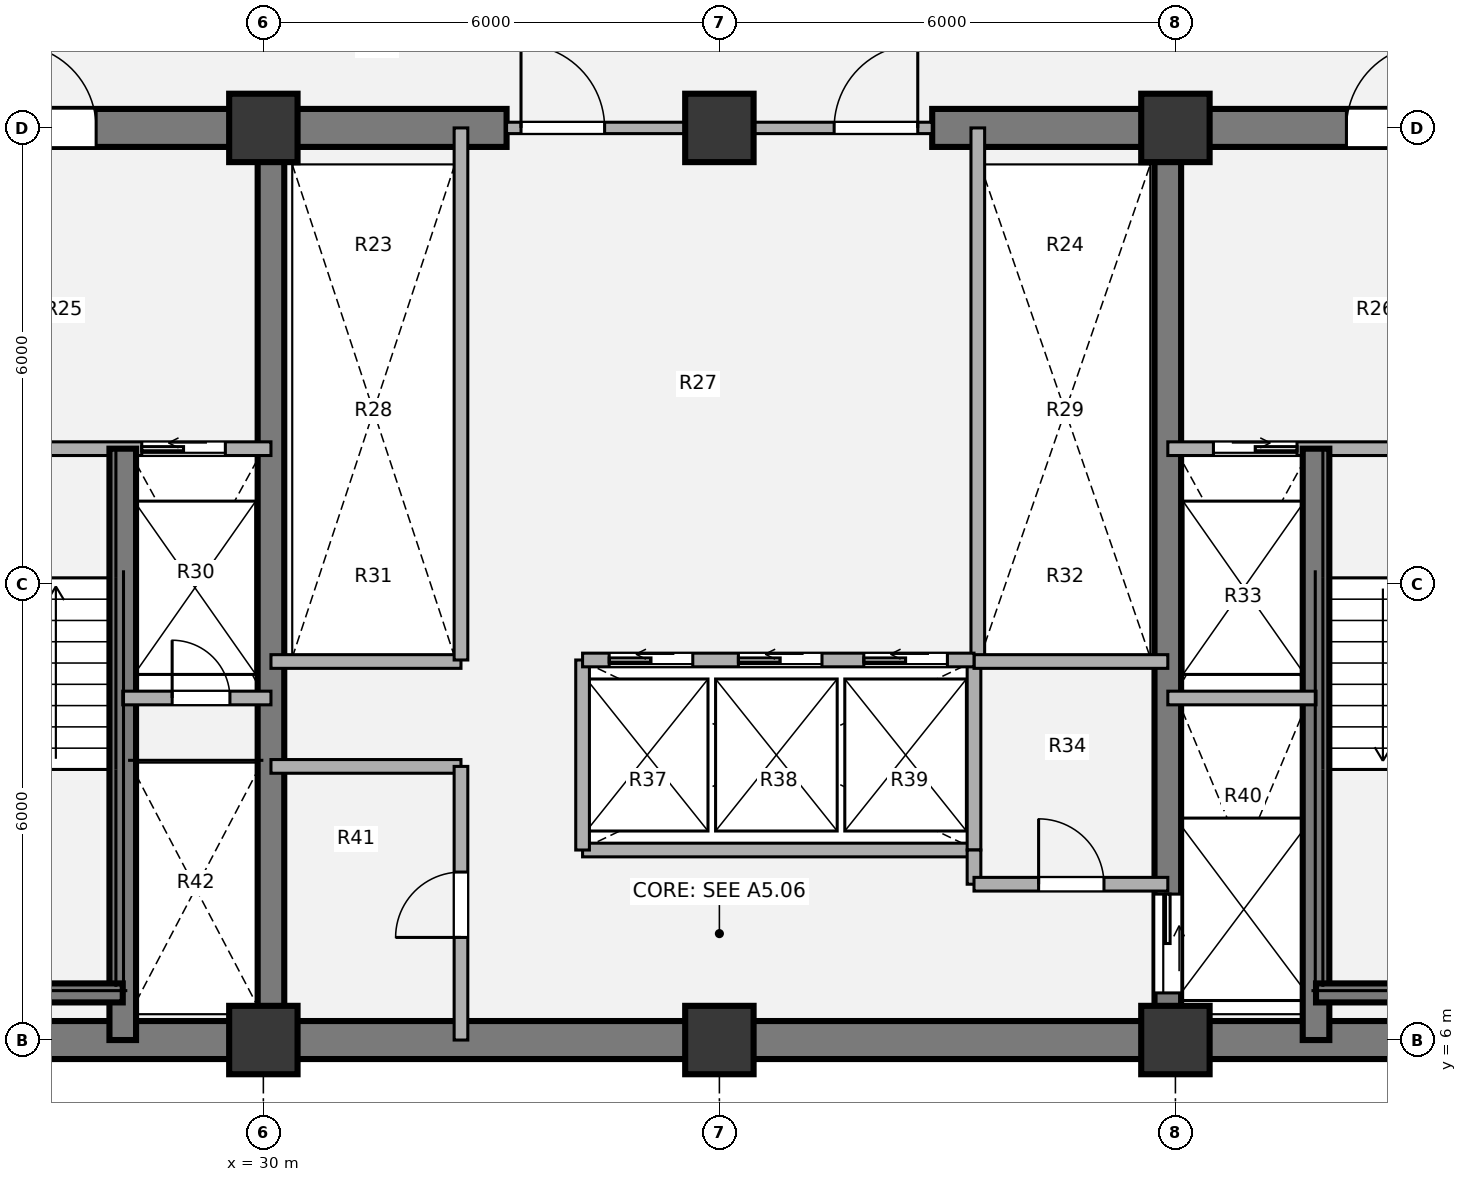
"""IFC4 building model, lengths in metres.
Left out: names, types, materials, properties, quantities, classifications, styles, units other than length and angle.
Written with IfcOpenShell. Run it as: python <this file> out.ifc"""

import sys

from ifc_helpers import new_model, si_unit, direction, frame, frame_2d, origin, origin_2d, place, context, subcontext, project, spatial, rectangle, extrude, source, transform, mapped, element, fill, save


model = new_model("IFC4")
c1 = context("Model", 3, precision=1e-05, world=origin(), true_north=direction((0.0, 1.0)))
c2 = subcontext(c1, "Body", "Model", "MODEL_VIEW")
j1 = project(units=[si_unit("LENGTHUNIT", "METRE"), si_unit("PLANEANGLEUNIT", "RADIAN")], contexts=[c1])
p1 = place(None, origin())
s1 = spatial("IfcSite", under=j1, at=p1, CompositionType="ELEMENT")
p2 = place(p1, origin())
s2 = spatial("IfcBuilding", under=s1, at=p2, CompositionType="ELEMENT")
p3 = place(p2, frame((0.0, 0.0, 89.82)))
s3 = spatial("IfcBuildingStorey", under=s2, at=p3, CompositionType="ELEMENT", Elevation=89.82)
m1 = source(origin(), c2, "Body", "SweptSolid", [
    extrude(rectangle(XDim=0.9, YDim=0.9, at=origin_2d()), origin(), (0.0, 0.0, 1.0), 3.78),
])
for number, where, z_axis, x_axis in (
    (1, (30.0, 6.0, 0.0), (0.0, 0.0, 1.0), (1.0, 0.0, 0.0)),
    (2, (36.0, 6.0, 0.0), (0.0, 0.0, 1.0), (1.0, 0.0, 0.0)),
    (3, (42.0, 6.0, 0.0), (0.0, 0.0, 1.0), (1.0, 0.0, 0.0)),
    (4, (30.0, 18.0, 0.0), (0.0, 0.0, 1.0), (1.0, 0.0, 0.0)),
    (5, (36.0, 18.0, 0.0), (0.0, 0.0, 1.0), (1.0, 0.0, 0.0)),
    (6, (42.0, 18.0, 0.0), (0.0, 0.0, 1.0), (1.0, 0.0, 0.0)),
):
    element("IfcColumn", number, at=place(p3, frame(where, z_axis=z_axis, x_axis=x_axis)), inside=s3, PredefinedType="COLUMN", context=c2, shape_type="MappedRepresentation", body=[
        mapped(m1, transform((0.0, 0.0, 0.0), x_axis=(1.0, 0.0, 0.0), y_axis=(0.0, 1.0, 0.0), z_axis=(0.0, 0.0, 1.0), scale=1.0)),
    ])
p4 = place(p3, frame((48.25, 6.0, 0.0), z_axis=(0.0, 0.0, 1.0), x_axis=(-1.0, 0.0, 0.0)))
e7 = element("IfcWall", 7, at=p4, inside=s3, PredefinedType="SHEAR", context=c2, shape_type="SweptSolid", body=[
    extrude(rectangle(XDim=24.5, YDim=0.5, at=frame_2d((12.25, 0.0))), origin(), (0.0, 0.0, 1.0), 3.78),
])
p5 = place(p3, frame((23.75, 18.0, 0.0), z_axis=(0.0, 0.0, 1.0), x_axis=(1.0, 0.0, 0.0)))
e8 = element("IfcWall", 8, at=p5, inside=s3, PredefinedType="SHEAR", context=c2, shape_type="SweptSolid", body=[
    extrude(rectangle(XDim=9.45, YDim=0.5, at=frame_2d((4.725, 0.0))), origin(), (0.0, 0.0, 1.0), 3.78),
])
p6 = place(p5, frame((2.95, 0.0, 0.0)))
e9 = element("IfcOpeningElement", 9, at=p6, cuts=e8, PredefinedType="OPENING", context=c2, shape_type="SweptSolid", body=[
    extrude(rectangle(XDim=1.1, YDim=2.1, at=origin_2d()), frame((0.55, 0.26, 1.05), z_axis=(0.0, -1.0, 0.0), x_axis=(1.0, 0.0, 0.0)), (0.0, 0.0, 1.0), 0.52),
])
p7 = place(p3, frame((38.8, 18.0, 0.0), z_axis=(0.0, 0.0, 1.0), x_axis=(1.0, 0.0, 0.0)))
e10 = element("IfcWall", 10, at=p7, inside=s3, PredefinedType="SHEAR", context=c2, shape_type="SweptSolid", body=[
    extrude(rectangle(XDim=9.45, YDim=0.5, at=frame_2d((4.725, 0.0))), origin(), (0.0, 0.0, 1.0), 3.78),
])
p8 = place(p7, frame((5.45, 0.0, 0.0)))
e11 = element("IfcOpeningElement", 11, at=p8, cuts=e10, PredefinedType="OPENING", context=c2, shape_type="SweptSolid", body=[
    extrude(rectangle(XDim=1.1, YDim=2.1, at=origin_2d()), frame((0.55, 0.26, 1.05), z_axis=(0.0, -1.0, 0.0), x_axis=(1.0, 0.0, 0.0)), (0.0, 0.0, 1.0), 0.52),
])
p9 = place(p3, frame((30.1, 6.0, 0.0), z_axis=(0.0, 0.0, 1.0), x_axis=(0.0, 1.0, 0.0)))
e12 = element("IfcWall", 12, at=p9, inside=s3, PredefinedType="SHEAR", context=c2, shape_type="SweptSolid", body=[
    extrude(rectangle(XDim=12.0, YDim=0.35, at=frame_2d((6.0, 0.0))), origin(), (0.0, 0.0, 1.0), 3.78),
])
p10 = place(p3, frame((41.9, 18.0, 0.0), z_axis=(0.0, 0.0, 1.0), x_axis=(0.0, -1.0, 0.0)))
e13 = element("IfcWall", 13, at=p10, inside=s3, PredefinedType="SHEAR", context=c2, shape_type="SweptSolid", body=[
    extrude(rectangle(XDim=12.0, YDim=0.35, at=frame_2d((6.0, 0.0))), origin(), (0.0, 0.0, 1.0), 3.78),
])
p11 = place(p10, frame((10.08, 0.0, 0.0)))
e14 = element("IfcOpeningElement", 14, at=p11, cuts=e13, PredefinedType="OPENING", context=c2, shape_type="SweptSolid", body=[
    extrude(rectangle(XDim=1.3, YDim=2.1, at=origin_2d()), frame((0.65, 0.185, 1.05), z_axis=(0.0, -1.0, 0.0), x_axis=(1.0, 0.0, 0.0)), (0.0, 0.0, 1.0), 0.37),
])
p12 = place(p3, frame((34.2, 8.5, 0.0), z_axis=(0.0, 0.0, 1.0), x_axis=(1.0, 0.0, 0.0)))
e15 = element("IfcWall", 15, at=p12, inside=s3, PredefinedType="PARTITIONING", context=c2, shape_type="SweptSolid", body=[
    extrude(rectangle(XDim=5.15, YDim=0.18, at=frame_2d((2.575, 0.0))), origin(), (0.0, 0.0, 1.0), 3.5),
])
for number, where, z_axis, x_axis in (
    (16, (34.2, 8.5, 0.0), (0.0, 0.0, 1.0), (0.0, 1.0, 0.0)),
    (17, (39.35, 8.5, 0.0), (0.0, 0.0, 1.0), (0.0, 1.0, 0.0)),
):
    element("IfcWall", number, at=place(p3, frame(where, z_axis=z_axis, x_axis=x_axis)), inside=s3, PredefinedType="PARTITIONING", context=c2, shape_type="SweptSolid", body=[
        extrude(rectangle(XDim=2.5, YDim=0.18, at=frame_2d((1.25, 0.0))), origin(), (0.0, 0.0, 1.0), 3.5),
    ])
p13 = place(p3, frame((39.4, 11.0, 0.0), z_axis=(0.0, 0.0, 1.0), x_axis=(0.0, 1.0, 0.0)))
e18 = element("IfcWall", 18, at=p13, inside=s3, PredefinedType="PARTITIONING", context=c2, shape_type="SweptSolid", body=[
    extrude(rectangle(XDim=7.0, YDim=0.18, at=frame_2d((3.5, 0.0))), origin(), (0.0, 0.0, 1.0), 3.5),
])
for number, where, z_axis, x_axis in (
    (19, (30.1, 10.98, 0.0), (0.0, 0.0, 1.0), (1.0, 0.0, 0.0)),
    (20, (30.1, 9.6, 0.0), (0.0, 0.0, 1.0), (1.0, 0.0, 0.0)),
):
    element("IfcWall", number, at=place(p3, frame(where, z_axis=z_axis, x_axis=x_axis)), inside=s3, PredefinedType="PARTITIONING", context=c2, shape_type="SweptSolid", body=[
        extrude(rectangle(XDim=2.5, YDim=0.18, at=frame_2d((1.25, 0.0))), origin(), (0.0, 0.0, 1.0), 3.5),
    ])
p14 = place(p3, frame((32.6, 6.0, 0.0), z_axis=(0.0, 0.0, 1.0), x_axis=(0.0, 1.0, 0.0)))
e21 = element("IfcWall", 21, at=p14, inside=s3, PredefinedType="PARTITIONING", context=c2, shape_type="SweptSolid", body=[
    extrude(rectangle(XDim=3.6, YDim=0.18, at=frame_2d((1.8, 0.0))), origin(), (0.0, 0.0, 1.0), 3.5),
])
p15 = place(p14, frame((1.35, 0.0, 0.0)))
e22 = element("IfcOpeningElement", 22, at=p15, cuts=e21, PredefinedType="OPENING", context=c2, shape_type="SweptSolid", body=[
    extrude(rectangle(XDim=0.86, YDim=2.1, at=origin_2d()), frame((0.43, 0.1, 1.05), z_axis=(0.0, -1.0, 0.0), x_axis=(1.0, 0.0, 0.0)), (0.0, 0.0, 1.0), 0.2),
])
p16 = place(p3, frame((39.35, 10.98, 0.0), z_axis=(0.0, 0.0, 1.0), x_axis=(1.0, 0.0, 0.0)))
e23 = element("IfcWall", 23, at=p16, inside=s3, PredefinedType="PARTITIONING", context=c2, shape_type="SweptSolid", body=[
    extrude(rectangle(XDim=2.55, YDim=0.18, at=frame_2d((1.275, 0.0))), origin(), (0.0, 0.0, 1.0), 3.5),
])
p17 = place(p3, frame((39.35, 8.05, 0.0), z_axis=(0.0, 0.0, 1.0), x_axis=(0.0, 1.0, 0.0)))
e24 = element("IfcWall", 24, at=p17, inside=s3, PredefinedType="PARTITIONING", context=c2, shape_type="SweptSolid", body=[
    extrude(rectangle(XDim=0.45, YDim=0.18, at=frame_2d((0.225, 0.0))), origin(), (0.0, 0.0, 1.0), 3.5),
])
p18 = place(p3, frame((39.35, 8.05, 0.0), z_axis=(0.0, 0.0, 1.0), x_axis=(1.0, 0.0, 0.0)))
e25 = element("IfcWall", 25, at=p18, inside=s3, PredefinedType="PARTITIONING", context=c2, shape_type="SweptSolid", body=[
    extrude(rectangle(XDim=2.55, YDim=0.18, at=frame_2d((1.275, 0.0))), origin(), (0.0, 0.0, 1.0), 3.5),
])
p19 = place(p18, frame((0.85, 0.0, 0.0)))
e26 = element("IfcOpeningElement", 26, at=p19, cuts=e25, PredefinedType="OPENING", context=c2, shape_type="SweptSolid", body=[
    extrude(rectangle(XDim=0.86, YDim=2.1, at=origin_2d()), frame((0.43, 0.1, 1.05), z_axis=(0.0, -1.0, 0.0), x_axis=(1.0, 0.0, 0.0)), (0.0, 0.0, 1.0), 0.2),
])
p20 = place(p3, frame((33.2, 18.0, 0.0), z_axis=(0.0, 0.0, 1.0), x_axis=(1.0, 0.0, 0.0)))
e27 = element("IfcWall", 27, at=p20, inside=s3, PredefinedType="PARTITIONING", context=c2, shape_type="SweptSolid", body=[
    extrude(rectangle(XDim=5.6, YDim=0.15, at=frame_2d((2.8, 0.0))), origin(), (0.0, 0.0, 1.0), 2.315),
])
p21 = place(p20, frame((0.19, 0.0, 0.0)))
e28 = element("IfcOpeningElement", 28, at=p21, cuts=e27, PredefinedType="OPENING", context=c2, shape_type="SweptSolid", body=[
    extrude(rectangle(XDim=1.1, YDim=2.1, at=origin_2d()), frame((0.55, 0.085, 1.05), z_axis=(0.0, -1.0, 0.0), x_axis=(1.0, 0.0, 0.0)), (0.0, 0.0, 1.0), 0.17),
])
p22 = place(p20, frame((4.31, 0.0, 0.0)))
e29 = element("IfcOpeningElement", 29, at=p22, cuts=e27, PredefinedType="OPENING", context=c2, shape_type="SweptSolid", body=[
    extrude(rectangle(XDim=1.1, YDim=2.1, at=origin_2d()), frame((0.55, 0.085, 1.05), z_axis=(0.0, -1.0, 0.0), x_axis=(1.0, 0.0, 0.0)), (0.0, 0.0, 1.0), 0.17),
])
p23 = place(p3, frame((24.0, 13.78, 0.0), z_axis=(0.0, 0.0, 1.0), x_axis=(1.0, 0.0, 0.0)))
e30 = element("IfcWall", 30, at=p23, inside=s3, PredefinedType="PARTITIONING", context=c2, shape_type="SweptSolid", body=[
    extrude(rectangle(XDim=6.1, YDim=0.18, at=frame_2d((3.05, 0.0))), origin(), (0.0, 0.0, 1.0), 3.5),
])
p24 = place(p23, frame((1.15, 0.0, 0.0)))
e31 = element("IfcOpeningElement", 31, at=p24, cuts=e30, PredefinedType="OPENING", context=c2, shape_type="SweptSolid", body=[
    extrude(rectangle(XDim=1.1, YDim=2.1, at=origin_2d()), frame((0.55, 0.1, 1.05), z_axis=(0.0, -1.0, 0.0), x_axis=(1.0, 0.0, 0.0)), (0.0, 0.0, 1.0), 0.2),
])
p25 = place(p23, frame((4.4, 0.0, 0.0)))
e32 = element("IfcOpeningElement", 32, at=p25, cuts=e30, PredefinedType="OPENING", context=c2, shape_type="SweptSolid", body=[
    extrude(rectangle(XDim=1.1, YDim=2.1, at=origin_2d()), frame((0.55, 0.1, 1.05), z_axis=(0.0, -1.0, 0.0), x_axis=(1.0, 0.0, 0.0)), (0.0, 0.0, 1.0), 0.2),
])
p26 = place(p3, frame((28.15, 6.0, 0.0), z_axis=(0.0, 0.0, 1.0), x_axis=(0.0, 1.0, 0.0)))
e33 = element("IfcWall", 33, at=p26, inside=s3, PredefinedType="SHEAR", context=c2, shape_type="SweptSolid", body=[
    extrude(rectangle(XDim=7.78, YDim=0.35, at=frame_2d((3.89, 0.0))), origin(), (0.0, 0.0, 1.0), 3.85),
])
p27 = place(p3, frame((24.58, 6.62, 0.0), z_axis=(0.0, 0.0, 1.0), x_axis=(1.0, 0.0, 0.0)))
e34 = element("IfcWall", 34, at=p27, inside=s3, PredefinedType="SHEAR", context=c2, shape_type="SweptSolid", body=[
    extrude(rectangle(XDim=3.57, YDim=0.25, at=frame_2d((1.785, 0.0))), origin(), (0.0, 0.0, 1.0), 3.85),
])
p28 = place(p3, frame((28.15, 10.5, 0.0), z_axis=(0.0, 0.0, 1.0), x_axis=(1.0, 0.0, 0.0)))
e35 = element("IfcWall", 35, at=p28, inside=s3, PredefinedType="PARTITIONING", context=c2, shape_type="SweptSolid", body=[
    extrude(rectangle(XDim=1.95, YDim=0.18, at=frame_2d((0.975, 0.0))), origin(), (0.0, 0.0, 1.0), 3.5),
])
p29 = place(p28, frame((0.65, 0.0, 0.0)))
e36 = element("IfcOpeningElement", 36, at=p29, cuts=e35, PredefinedType="OPENING", context=c2, shape_type="SweptSolid", body=[
    extrude(rectangle(XDim=0.76, YDim=2.05, at=origin_2d()), frame((0.38, 0.1, 1.025), z_axis=(0.0, -1.0, 0.0), x_axis=(1.0, 0.0, 0.0)), (0.0, 0.0, 1.0), 0.2),
])
p30 = place(p3, frame((41.9, 13.78, 0.0), z_axis=(0.0, 0.0, 1.0), x_axis=(1.0, 0.0, 0.0)))
e37 = element("IfcWall", 37, at=p30, inside=s3, PredefinedType="PARTITIONING", context=c2, shape_type="SweptSolid", body=[
    extrude(rectangle(XDim=6.1, YDim=0.18, at=frame_2d((3.05, 0.0))), origin(), (0.0, 0.0, 1.0), 3.5),
])
p31 = place(p30, frame((0.6, 0.0, 0.0)))
e38 = element("IfcOpeningElement", 38, at=p31, cuts=e37, PredefinedType="OPENING", context=c2, shape_type="SweptSolid", body=[
    extrude(rectangle(XDim=1.1, YDim=2.1, at=origin_2d()), frame((0.55, 0.1, 1.05), z_axis=(0.0, -1.0, 0.0), x_axis=(1.0, 0.0, 0.0)), (0.0, 0.0, 1.0), 0.2),
])
p32 = place(p30, frame((3.8, 0.0, 0.0)))
e39 = element("IfcOpeningElement", 39, at=p32, cuts=e37, PredefinedType="OPENING", context=c2, shape_type="SweptSolid", body=[
    extrude(rectangle(XDim=1.1, YDim=2.1, at=origin_2d()), frame((0.55, 0.1, 1.05), z_axis=(0.0, -1.0, 0.0), x_axis=(1.0, 0.0, 0.0)), (0.0, 0.0, 1.0), 0.2),
])
p33 = place(p3, frame((43.85, 6.0, 0.0), z_axis=(0.0, 0.0, 1.0), x_axis=(0.0, 1.0, 0.0)))
e40 = element("IfcWall", 40, at=p33, inside=s3, PredefinedType="SHEAR", context=c2, shape_type="SweptSolid", body=[
    extrude(rectangle(XDim=7.78, YDim=0.35, at=frame_2d((3.89, 0.0))), origin(), (0.0, 0.0, 1.0), 3.85),
])
p34 = place(p3, frame((43.85, 6.62, 0.0), z_axis=(0.0, 0.0, 1.0), x_axis=(1.0, 0.0, 0.0)))
e41 = element("IfcWall", 41, at=p34, inside=s3, PredefinedType="SHEAR", context=c2, shape_type="SweptSolid", body=[
    extrude(rectangle(XDim=3.57, YDim=0.25, at=frame_2d((1.785, 0.0))), origin(), (0.0, 0.0, 1.0), 3.85),
])
p35 = place(p3, frame((41.9, 10.5, 0.0), z_axis=(0.0, 0.0, 1.0), x_axis=(1.0, 0.0, 0.0)))
e42 = element("IfcWall", 42, at=p35, inside=s3, PredefinedType="PARTITIONING", context=c2, shape_type="SweptSolid", body=[
    extrude(rectangle(XDim=1.95, YDim=0.18, at=frame_2d((0.975, 0.0))), origin(), (0.0, 0.0, 1.0), 3.5),
])
p36 = place(p3, frame((32.6, 11.0, 0.0), z_axis=(0.0, 0.0, 1.0), x_axis=(0.0, 1.0, 0.0)))
e43 = element("IfcWall", 43, at=p36, inside=s3, PredefinedType="PARTITIONING", context=c2, shape_type="SweptSolid", body=[
    extrude(rectangle(XDim=7.0, YDim=0.18, at=frame_2d((3.5, 0.0))), origin(), (0.0, 0.0, 1.0), 3.5),
])
p37 = place(p3, frame((34.2, 11.0, 0.0), z_axis=(0.0, 0.0, 1.0), x_axis=(1.0, 0.0, 0.0)))
e44 = element("IfcWall", 44, at=p37, inside=s3, PredefinedType="PARTITIONING", context=c2, shape_type="SweptSolid", body=[
    extrude(rectangle(XDim=5.15, YDim=0.18, at=frame_2d((2.575, 0.0))), origin(), (0.0, 0.0, 1.0), 3.5),
])
p38 = place(p37, frame((0.35, 0.0, 0.0)))
e45 = element("IfcOpeningElement", 45, at=p38, cuts=e44, PredefinedType="OPENING", context=c2, shape_type="SweptSolid", body=[
    extrude(rectangle(XDim=1.1, YDim=2.1, at=origin_2d()), frame((0.55, 0.1, 1.05), z_axis=(0.0, -1.0, 0.0), x_axis=(1.0, 0.0, 0.0)), (0.0, 0.0, 1.0), 0.2),
])
p39 = place(p37, frame((2.05, 0.0, 0.0)))
e46 = element("IfcOpeningElement", 46, at=p39, cuts=e44, PredefinedType="OPENING", context=c2, shape_type="SweptSolid", body=[
    extrude(rectangle(XDim=1.1, YDim=2.1, at=origin_2d()), frame((0.55, 0.1, 1.05), z_axis=(0.0, -1.0, 0.0), x_axis=(1.0, 0.0, 0.0)), (0.0, 0.0, 1.0), 0.2),
])
p40 = place(p37, frame((3.7, 0.0, 0.0)))
e47 = element("IfcOpeningElement", 47, at=p40, cuts=e44, PredefinedType="OPENING", context=c2, shape_type="SweptSolid", body=[
    extrude(rectangle(XDim=1.1, YDim=2.1, at=origin_2d()), frame((0.55, 0.1, 1.05), z_axis=(0.0, -1.0, 0.0), x_axis=(1.0, 0.0, 0.0)), (0.0, 0.0, 1.0), 0.2),
])
m2 = source(origin(), c2, "Body", "SweptSolid", [
    extrude(rectangle(XDim=0.86, YDim=2.1, at=origin_2d()), frame((0.43, 0.025, 1.05), z_axis=(0.0, -1.0, 0.0), x_axis=(1.0, 0.0, 0.0)), (0.0, 0.0, 1.0), 0.05),
])
p41 = place(p15, origin())
e48 = element("IfcDoor", 48, at=p41, inside=s3, OperationType="SINGLE_SWING_LEFT", PredefinedType="DOOR", context=c2, shape_type="MappedRepresentation", body=[
    mapped(m2, transform((0.0, 0.0, 0.0), x_axis=(1.0, 0.0, 0.0), y_axis=(0.0, 1.0, 0.0), z_axis=(0.0, 0.0, 1.0), scale=1.0)),
])
fill(e22, e48)
p42 = place(p19, origin())
e49 = element("IfcDoor", 49, at=p42, inside=s3, OperationType="SINGLE_SWING_LEFT", PredefinedType="DOOR", context=c2, shape_type="MappedRepresentation", body=[
    mapped(m2, transform((0.0, 0.0, 0.0), x_axis=(1.0, 0.0, 0.0), y_axis=(0.0, 1.0, 0.0), z_axis=(0.0, 0.0, 1.0), scale=1.0)),
])
fill(e26, e49)
m3 = source(origin(), c2, "Body", "SweptSolid", [
    extrude(rectangle(XDim=1.1, YDim=2.1, at=origin_2d()), frame((0.55, 0.025, 1.05), z_axis=(0.0, -1.0, 0.0), x_axis=(1.0, 0.0, 0.0)), (0.0, 0.0, 1.0), 0.05),
])
p43 = place(p21, origin())
e50 = element("IfcDoor", 50, at=p43, inside=s3, OperationType="SINGLE_SWING_LEFT", PredefinedType="DOOR", context=c2, shape_type="MappedRepresentation", body=[
    mapped(m3, transform((0.0, 0.0, 0.0), x_axis=(1.0, 0.0, 0.0), y_axis=(0.0, 1.0, 0.0), z_axis=(0.0, 0.0, 1.0), scale=1.0)),
])
fill(e28, e50)
p44 = place(p22, origin())
e51 = element("IfcDoor", 51, at=p44, inside=s3, OperationType="SINGLE_SWING_RIGHT", PredefinedType="DOOR", context=c2, shape_type="MappedRepresentation", body=[
    mapped(m3, transform((0.0, 0.0, 0.0), x_axis=(1.0, 0.0, 0.0), y_axis=(0.0, 1.0, 0.0), z_axis=(0.0, 0.0, 1.0), scale=1.0)),
])
fill(e29, e51)
m4 = source(origin(), c2, "Body", "SweptSolid", [
    extrude(rectangle(XDim=1.1, YDim=2.1, at=origin_2d()), frame((0.55, 0.025, 1.05), z_axis=(0.0, -1.0, 0.0), x_axis=(1.0, 0.0, 0.0)), (0.0, 0.0, 1.0), 0.05),
])
p45 = place(p25, origin())
e52 = element("IfcDoor", 52, at=p45, inside=s3, OperationType="SLIDING_TO_LEFT", PredefinedType="DOOR", context=c2, shape_type="MappedRepresentation", body=[
    mapped(m4, transform((0.0, 0.0, 0.0), x_axis=(1.0, 0.0, 0.0), y_axis=(0.0, 1.0, 0.0), z_axis=(0.0, 0.0, 1.0), scale=1.0)),
])
fill(e32, e52)
m5 = source(origin(), c2, "Body", "SweptSolid", [
    extrude(rectangle(XDim=0.76, YDim=2.05, at=origin_2d()), frame((0.38, 0.025, 1.025), z_axis=(0.0, -1.0, 0.0), x_axis=(1.0, 0.0, 0.0)), (0.0, 0.0, 1.0), 0.05),
])
p46 = place(p29, origin())
e53 = element("IfcDoor", 53, at=p46, inside=s3, OperationType="SINGLE_SWING_LEFT", PredefinedType="DOOR", context=c2, shape_type="MappedRepresentation", body=[
    mapped(m5, transform((0.0, 0.0, 0.0), x_axis=(1.0, 0.0, 0.0), y_axis=(0.0, 1.0, 0.0), z_axis=(0.0, 0.0, 1.0), scale=1.0)),
])
fill(e36, e53)
p47 = place(p31, origin())
e54 = element("IfcDoor", 54, at=p47, inside=s3, OperationType="SLIDING_TO_RIGHT", PredefinedType="DOOR", context=c2, shape_type="MappedRepresentation", body=[
    mapped(m4, transform((0.0, 0.0, 0.0), x_axis=(1.0, 0.0, 0.0), y_axis=(0.0, 1.0, 0.0), z_axis=(0.0, 0.0, 1.0), scale=1.0)),
])
fill(e38, e54)
m6 = source(origin(), c2, "Body", "SweptSolid", [
    extrude(rectangle(XDim=1.3, YDim=2.1, at=origin_2d()), frame((0.65, 0.025, 1.05), z_axis=(0.0, -1.0, 0.0), x_axis=(1.0, 0.0, 0.0)), (0.0, 0.0, 1.0), 0.05),
])
p48 = place(p11, origin())
e55 = element("IfcDoor", 55, at=p48, inside=s3, OperationType="SLIDING_TO_LEFT", PredefinedType="DOOR", context=c2, shape_type="MappedRepresentation", body=[
    mapped(m6, transform((0.0, 0.0, 0.0), x_axis=(1.0, 0.0, 0.0), y_axis=(0.0, 1.0, 0.0), z_axis=(0.0, 0.0, 1.0), scale=1.0)),
])
fill(e14, e55)
p49 = place(p6, origin())
e56 = element("IfcDoor", 56, at=p49, inside=s3, OperationType="SINGLE_SWING_LEFT", PredefinedType="DOOR", context=c2, shape_type="MappedRepresentation", body=[
    mapped(m3, transform((0.0, 0.0, 0.0), x_axis=(1.0, 0.0, 0.0), y_axis=(0.0, 1.0, 0.0), z_axis=(0.0, 0.0, 1.0), scale=1.0)),
])
fill(e9, e56)
p50 = place(p8, origin())
e57 = element("IfcDoor", 57, at=p50, inside=s3, OperationType="SINGLE_SWING_RIGHT", PredefinedType="DOOR", context=c2, shape_type="MappedRepresentation", body=[
    mapped(m3, transform((0.0, 0.0, 0.0), x_axis=(1.0, 0.0, 0.0), y_axis=(0.0, 1.0, 0.0), z_axis=(0.0, 0.0, 1.0), scale=1.0)),
])
fill(e11, e57)
p51 = place(p38, origin())
e58 = element("IfcDoor", 58, at=p51, inside=s3, OperationType="SLIDING_TO_LEFT", PredefinedType="DOOR", context=c2, shape_type="MappedRepresentation", body=[
    mapped(m4, transform((0.0, 0.0, 0.0), x_axis=(1.0, 0.0, 0.0), y_axis=(0.0, 1.0, 0.0), z_axis=(0.0, 0.0, 1.0), scale=1.0)),
])
fill(e45, e58)
p52 = place(p39, origin())
e59 = element("IfcDoor", 59, at=p52, inside=s3, OperationType="SLIDING_TO_LEFT", PredefinedType="DOOR", context=c2, shape_type="MappedRepresentation", body=[
    mapped(m4, transform((0.0, 0.0, 0.0), x_axis=(1.0, 0.0, 0.0), y_axis=(0.0, 1.0, 0.0), z_axis=(0.0, 0.0, 1.0), scale=1.0)),
])
fill(e46, e59)
p53 = place(p40, origin())
e60 = element("IfcDoor", 60, at=p53, inside=s3, OperationType="SLIDING_TO_LEFT", PredefinedType="DOOR", context=c2, shape_type="MappedRepresentation", body=[
    mapped(m4, transform((0.0, 0.0, 0.0), x_axis=(1.0, 0.0, 0.0), y_axis=(0.0, 1.0, 0.0), z_axis=(0.0, 0.0, 1.0), scale=1.0)),
])
fill(e47, e60)
save(model, sys.argv[1])
